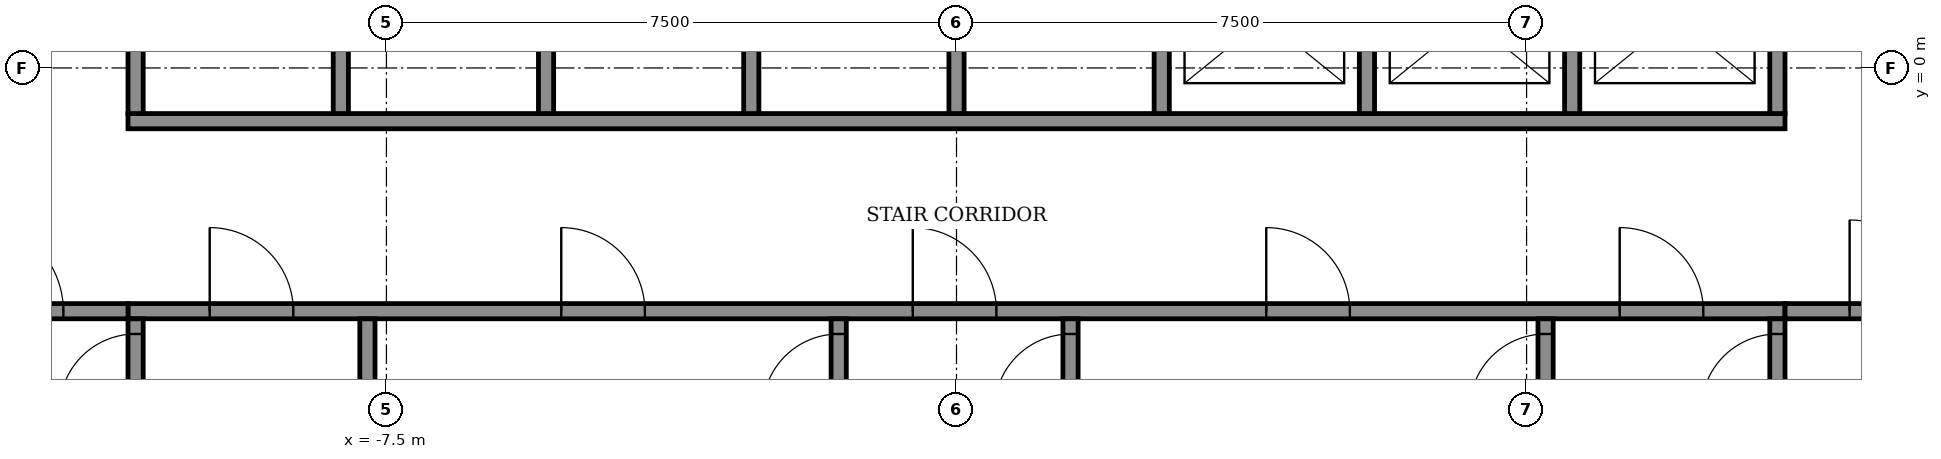
"""IFC4 building model, lengths in metres.
Left out: names, types, materials, properties, quantities, classifications, styles, units other than length and angle.
Written with IfcOpenShell. Run it as: python <this file> out.ifc"""

import sys

from ifc_helpers import new_model, si_unit, direction, frame, frame_2d, origin, place, context, subcontext, project, spatial, rectangle, extrude, element, fill, save


model = new_model("IFC4")
c1 = context("Model", 3, precision=1e-05, world=origin(), true_north=direction((0.0, 1.0)))
c2 = subcontext(c1, "Body", "Model", "MODEL_VIEW")
j1 = project(units=[si_unit("LENGTHUNIT", "METRE"), si_unit("PLANEANGLEUNIT", "RADIAN")], contexts=[c1])
p1 = place(None, origin())
s1 = spatial("IfcSite", under=j1, at=p1, CompositionType="ELEMENT")
p2 = place(p1, origin())
s2 = spatial("IfcBuilding", under=s1, at=p2, CompositionType="ELEMENT")
p3 = place(p2, frame((0.0, 0.0, 119.9)))
s3 = spatial("IfcBuildingStorey", under=s2, at=p3, CompositionType="ELEMENT", Elevation=119.9)
p4 = place(p3, frame((-10.9, -3.2, 0.0), z_axis=(0.0, 0.0, 1.0), x_axis=(1.0, 0.0, 0.0)))
e1 = element("IfcWall", 1, at=p4, inside=s3, PredefinedType="SHEAR", context=c2, shape_type="SweptSolid", body=[
    extrude(rectangle(XDim=21.8, YDim=0.2, at=frame_2d((10.9, 0.0))), origin(), (0.0, 0.0, 1.0), 5.05),
])
p5 = place(p4, frame((1.075, 0.0, 0.0)))
e2 = element("IfcOpeningElement", 2, at=p5, cuts=e1, PredefinedType="OPENING", context=c2, shape_type="SweptSolid", body=[
    extrude(rectangle(XDim=1.1, YDim=2.1, at=frame_2d((0.55, 1.05))), frame((0.0, 0.11, 0.0), z_axis=(0.0, -1.0, 0.0), x_axis=(1.0, 0.0, 0.0)), (0.0, 0.0, 1.0), 0.22),
])
p6 = place(p4, frame((10.325, 0.0, 0.0)))
e3 = element("IfcOpeningElement", 3, at=p6, cuts=e1, PredefinedType="OPENING", context=c2, shape_type="SweptSolid", body=[
    extrude(rectangle(XDim=1.1, YDim=2.1, at=frame_2d((0.55, 1.05))), frame((0.0, 0.11, 0.0), z_axis=(0.0, -1.0, 0.0), x_axis=(1.0, 0.0, 0.0)), (0.0, 0.0, 1.0), 0.22),
])
p7 = place(p4, frame((19.625, 0.0, 0.0)))
e4 = element("IfcOpeningElement", 4, at=p7, cuts=e1, PredefinedType="OPENING", context=c2, shape_type="SweptSolid", body=[
    extrude(rectangle(XDim=1.1, YDim=2.1, at=frame_2d((0.55, 1.05))), frame((0.0, 0.11, 0.0), z_axis=(0.0, -1.0, 0.0), x_axis=(1.0, 0.0, 0.0)), (0.0, 0.0, 1.0), 0.22),
])
p8 = place(p4, frame((5.7, 0.0, 0.0)))
e5 = element("IfcOpeningElement", 5, at=p8, cuts=e1, PredefinedType="OPENING", context=c2, shape_type="SweptSolid", body=[
    extrude(rectangle(XDim=1.1, YDim=2.1, at=frame_2d((0.55, 1.05))), frame((0.0, 0.11, 0.0), z_axis=(0.0, -1.0, 0.0), x_axis=(1.0, 0.0, 0.0)), (0.0, 0.0, 1.0), 0.22),
])
p9 = place(p4, frame((14.975, 0.0, 0.0)))
e6 = element("IfcOpeningElement", 6, at=p9, cuts=e1, PredefinedType="OPENING", context=c2, shape_type="SweptSolid", body=[
    extrude(rectangle(XDim=1.1, YDim=2.1, at=frame_2d((0.55, 1.05))), frame((0.0, 0.11, 0.0), z_axis=(0.0, -1.0, 0.0), x_axis=(1.0, 0.0, 0.0)), (0.0, 0.0, 1.0), 0.22),
])
p10 = place(p3, frame((-10.9, -0.7, 0.0), z_axis=(0.0, 0.0, 1.0), x_axis=(1.0, 0.0, 0.0)))
e7 = element("IfcWall", 7, at=p10, inside=s3, PredefinedType="SHEAR", context=c2, shape_type="SweptSolid", body=[
    extrude(rectangle(XDim=21.8, YDim=0.2, at=frame_2d((10.9, 0.0))), origin(), (0.0, 0.0, 1.0), 5.05),
])
p11 = place(p3, frame((-10.8, -10.8, 0.0), z_axis=(0.0, 0.0, 1.0), x_axis=(0.0, 1.0, 0.0)))
e8 = element("IfcWall", 8, at=p11, inside=s3, PredefinedType="SHEAR", context=c2, shape_type="SweptSolid", body=[
    extrude(rectangle(XDim=7.5, YDim=0.2, at=frame_2d((3.75, 0.0))), origin(), (0.0, 0.0, 1.0), 5.05),
])
p12 = place(p11, frame((6.3, 0.0, 0.0)))
e9 = element("IfcOpeningElement", 9, at=p12, cuts=e8, PredefinedType="OPENING", context=c2, shape_type="SweptSolid", body=[
    extrude(rectangle(XDim=1.0, YDim=2.1, at=frame_2d((0.5, 1.05))), frame((0.0, 0.11, 0.0), z_axis=(0.0, -1.0, 0.0), x_axis=(1.0, 0.0, 0.0)), (0.0, 0.0, 1.0), 0.22),
])
p13 = place(p3, frame((-7.75, -10.8, 0.0), z_axis=(0.0, 0.0, 1.0), x_axis=(0.0, 1.0, 0.0)))
e10 = element("IfcWall", 10, at=p13, inside=s3, PredefinedType="SHEAR", context=c2, shape_type="SweptSolid", body=[
    extrude(rectangle(XDim=7.5, YDim=0.2, at=frame_2d((3.75, 0.0))), origin(), (0.0, 0.0, 1.0), 5.05),
])
p14 = place(p3, frame((-1.55, -10.8, 0.0), z_axis=(0.0, 0.0, 1.0), x_axis=(0.0, 1.0, 0.0)))
e11 = element("IfcWall", 11, at=p14, inside=s3, PredefinedType="SHEAR", context=c2, shape_type="SweptSolid", body=[
    extrude(rectangle(XDim=7.5, YDim=0.2, at=frame_2d((3.75, 0.0))), origin(), (0.0, 0.0, 1.0), 5.05),
])
p15 = place(p14, frame((6.3, 0.0, 0.0)))
e12 = element("IfcOpeningElement", 12, at=p15, cuts=e11, PredefinedType="OPENING", context=c2, shape_type="SweptSolid", body=[
    extrude(rectangle(XDim=1.0, YDim=2.1, at=frame_2d((0.5, 1.05))), frame((0.0, 0.11, 0.0), z_axis=(0.0, -1.0, 0.0), x_axis=(1.0, 0.0, 0.0)), (0.0, 0.0, 1.0), 0.22),
])
p16 = place(p3, frame((1.5, -10.8, 0.0), z_axis=(0.0, 0.0, 1.0), x_axis=(0.0, 1.0, 0.0)))
e13 = element("IfcWall", 13, at=p16, inside=s3, PredefinedType="SHEAR", context=c2, shape_type="SweptSolid", body=[
    extrude(rectangle(XDim=7.5, YDim=0.2, at=frame_2d((3.75, 0.0))), origin(), (0.0, 0.0, 1.0), 5.05),
])
p17 = place(p16, frame((6.3, 0.0, 0.0)))
e14 = element("IfcOpeningElement", 14, at=p17, cuts=e13, PredefinedType="OPENING", context=c2, shape_type="SweptSolid", body=[
    extrude(rectangle(XDim=1.0, YDim=2.1, at=frame_2d((0.5, 1.05))), frame((0.0, 0.11, 0.0), z_axis=(0.0, -1.0, 0.0), x_axis=(1.0, 0.0, 0.0)), (0.0, 0.0, 1.0), 0.22),
])
p18 = place(p3, frame((7.75, -10.8, 0.0), z_axis=(0.0, 0.0, 1.0), x_axis=(0.0, 1.0, 0.0)))
e15 = element("IfcWall", 15, at=p18, inside=s3, PredefinedType="SHEAR", context=c2, shape_type="SweptSolid", body=[
    extrude(rectangle(XDim=7.5, YDim=0.2, at=frame_2d((3.75, 0.0))), origin(), (0.0, 0.0, 1.0), 5.05),
])
p19 = place(p18, frame((6.3, 0.0, 0.0)))
e16 = element("IfcOpeningElement", 16, at=p19, cuts=e15, PredefinedType="OPENING", context=c2, shape_type="SweptSolid", body=[
    extrude(rectangle(XDim=1.0, YDim=2.1, at=frame_2d((0.5, 1.05))), frame((0.0, 0.11, 0.0), z_axis=(0.0, -1.0, 0.0), x_axis=(1.0, 0.0, 0.0)), (0.0, 0.0, 1.0), 0.22),
])
p20 = place(p3, frame((10.8, -10.8, 0.0), z_axis=(0.0, 0.0, 1.0), x_axis=(0.0, 1.0, 0.0)))
e17 = element("IfcWall", 17, at=p20, inside=s3, PredefinedType="SHEAR", context=c2, shape_type="SweptSolid", body=[
    extrude(rectangle(XDim=7.5, YDim=0.2, at=frame_2d((3.75, 0.0))), origin(), (0.0, 0.0, 1.0), 5.05),
])
p21 = place(p20, frame((6.3, 0.0, 0.0)))
e18 = element("IfcOpeningElement", 18, at=p21, cuts=e17, PredefinedType="OPENING", context=c2, shape_type="SweptSolid", body=[
    extrude(rectangle(XDim=1.0, YDim=2.1, at=frame_2d((0.5, 1.05))), frame((0.0, 0.11, 0.0), z_axis=(0.0, -1.0, 0.0), x_axis=(1.0, 0.0, 0.0)), (0.0, 0.0, 1.0), 0.22),
])
for number, where, z_axis, x_axis in (
    (19, (-10.8, -0.6, 0.0), (0.0, 0.0, 1.0), (0.0, 1.0, 0.0)),
    (20, (-8.1, -0.6, 0.0), (0.0, 0.0, 1.0), (0.0, 1.0, 0.0)),
    (21, (-5.4, -0.6, 0.0), (0.0, 0.0, 1.0), (0.0, 1.0, 0.0)),
    (22, (-2.7, -0.6, 0.0), (0.0, 0.0, 1.0), (0.0, 1.0, 0.0)),
    (23, (0.0, -0.6, 0.0), (0.0, 0.0, 1.0), (0.0, 1.0, 0.0)),
    (24, (2.7, -0.6, 0.0), (0.0, 0.0, 1.0), (0.0, 1.0, 0.0)),
    (25, (5.4, -0.6, 0.0), (0.0, 0.0, 1.0), (0.0, 1.0, 0.0)),
    (26, (8.1, -0.6, 0.0), (0.0, 0.0, 1.0), (0.0, 1.0, 0.0)),
    (27, (10.8, -0.6, 0.0), (0.0, 0.0, 1.0), (0.0, 1.0, 0.0)),
):
    element("IfcWall", number, at=place(p3, frame(where, z_axis=z_axis, x_axis=x_axis)), inside=s3, PredefinedType="SHEAR", context=c2, shape_type="SweptSolid", body=[
        extrude(rectangle(XDim=2.5, YDim=0.2, at=frame_2d((1.25, 0.0))), origin(), (0.0, 0.0, 1.0), 5.05),
    ])
p22 = place(p3, frame((-13.8, -3.2, 0.0), z_axis=(0.0, 0.0, 1.0), x_axis=(1.0, 0.0, 0.0)))
e28 = element("IfcWall", 28, at=p22, inside=s3, PredefinedType="STANDARD", context=c2, shape_type="SweptSolid", body=[
    extrude(rectangle(XDim=2.9, YDim=0.2, at=frame_2d((1.45, 0.0))), origin(), (0.0, 0.0, 1.0), 5.05),
])
p23 = place(p22, frame((0.85, 0.0, 0.0)))
e29 = element("IfcOpeningElement", 29, at=p23, cuts=e28, PredefinedType="OPENING", context=c2, shape_type="SweptSolid", body=[
    extrude(rectangle(XDim=1.2, YDim=2.1, at=frame_2d((0.6, 1.05))), frame((0.0, 0.11, 0.0), z_axis=(0.0, -1.0, 0.0), x_axis=(1.0, 0.0, 0.0)), (0.0, 0.0, 1.0), 0.22),
])
p24 = place(p3, frame((10.9, -3.2, 0.0), z_axis=(0.0, 0.0, 1.0), x_axis=(1.0, 0.0, 0.0)))
e30 = element("IfcWall", 30, at=p24, inside=s3, PredefinedType="STANDARD", context=c2, shape_type="SweptSolid", body=[
    extrude(rectangle(XDim=2.9, YDim=0.2, at=frame_2d((1.45, 0.0))), origin(), (0.0, 0.0, 1.0), 5.05),
])
p25 = place(p24, frame((0.85, 0.0, 0.0)))
e31 = element("IfcOpeningElement", 31, at=p25, cuts=e30, PredefinedType="OPENING", context=c2, shape_type="SweptSolid", body=[
    extrude(rectangle(XDim=1.2, YDim=2.1, at=frame_2d((0.6, 1.05))), frame((0.0, 0.11, 0.0), z_axis=(0.0, -1.0, 0.0), x_axis=(1.0, 0.0, 0.0)), (0.0, 0.0, 1.0), 0.22),
])
p26 = place(p5, origin())
e32 = element("IfcDoor", 32, at=p26, inside=s3, OperationType="SINGLE_SWING_RIGHT", PredefinedType="DOOR", context=c2, shape_type="SweptSolid", body=[
    extrude(rectangle(XDim=1.1, YDim=2.1, at=frame_2d((0.55, 1.05))), frame((0.0, 0.025, 0.0), z_axis=(0.0, -1.0, 0.0), x_axis=(1.0, 0.0, 0.0)), (0.0, 0.0, 1.0), 0.05),
])
fill(e2, e32)
p27 = place(p6, origin())
e33 = element("IfcDoor", 33, at=p27, inside=s3, OperationType="SINGLE_SWING_RIGHT", PredefinedType="DOOR", context=c2, shape_type="SweptSolid", body=[
    extrude(rectangle(XDim=1.1, YDim=2.1, at=frame_2d((0.55, 1.05))), frame((0.0, 0.025, 0.0), z_axis=(0.0, -1.0, 0.0), x_axis=(1.0, 0.0, 0.0)), (0.0, 0.0, 1.0), 0.05),
])
fill(e3, e33)
p28 = place(p7, origin())
e34 = element("IfcDoor", 34, at=p28, inside=s3, OperationType="SINGLE_SWING_RIGHT", PredefinedType="DOOR", context=c2, shape_type="SweptSolid", body=[
    extrude(rectangle(XDim=1.1, YDim=2.1, at=frame_2d((0.55, 1.05))), frame((0.0, 0.025, 0.0), z_axis=(0.0, -1.0, 0.0), x_axis=(1.0, 0.0, 0.0)), (0.0, 0.0, 1.0), 0.05),
])
fill(e4, e34)
p29 = place(p8, origin())
e35 = element("IfcDoor", 35, at=p29, inside=s3, OperationType="SINGLE_SWING_LEFT", PredefinedType="DOOR", context=c2, shape_type="SweptSolid", body=[
    extrude(rectangle(XDim=1.1, YDim=2.1, at=frame_2d((0.55, 1.05))), frame((0.0, 0.025, 0.0), z_axis=(0.0, -1.0, 0.0), x_axis=(1.0, 0.0, 0.0)), (0.0, 0.0, 1.0), 0.05),
])
fill(e5, e35)
p30 = place(p9, origin())
e36 = element("IfcDoor", 36, at=p30, inside=s3, OperationType="SINGLE_SWING_LEFT", PredefinedType="DOOR", context=c2, shape_type="SweptSolid", body=[
    extrude(rectangle(XDim=1.1, YDim=2.1, at=frame_2d((0.55, 1.05))), frame((0.0, 0.025, 0.0), z_axis=(0.0, -1.0, 0.0), x_axis=(1.0, 0.0, 0.0)), (0.0, 0.0, 1.0), 0.05),
])
fill(e6, e36)
p31 = place(p15, origin())
e37 = element("IfcDoor", 37, at=p31, inside=s3, OperationType="SINGLE_SWING_RIGHT", PredefinedType="DOOR", context=c2, shape_type="SweptSolid", body=[
    extrude(rectangle(XDim=1.0, YDim=2.1, at=frame_2d((0.5, 1.05))), frame((0.0, 0.025, 0.0), z_axis=(0.0, -1.0, 0.0), x_axis=(1.0, 0.0, 0.0)), (0.0, 0.0, 1.0), 0.05),
])
fill(e12, e37)
p32 = place(p17, origin())
e38 = element("IfcDoor", 38, at=p32, inside=s3, OperationType="SINGLE_SWING_RIGHT", PredefinedType="DOOR", context=c2, shape_type="SweptSolid", body=[
    extrude(rectangle(XDim=1.0, YDim=2.1, at=frame_2d((0.5, 1.05))), frame((0.0, 0.025, 0.0), z_axis=(0.0, -1.0, 0.0), x_axis=(1.0, 0.0, 0.0)), (0.0, 0.0, 1.0), 0.05),
])
fill(e14, e38)
p33 = place(p19, origin())
e39 = element("IfcDoor", 39, at=p33, inside=s3, OperationType="SINGLE_SWING_RIGHT", PredefinedType="DOOR", context=c2, shape_type="SweptSolid", body=[
    extrude(rectangle(XDim=1.0, YDim=2.1, at=frame_2d((0.5, 1.05))), frame((0.0, 0.025, 0.0), z_axis=(0.0, -1.0, 0.0), x_axis=(1.0, 0.0, 0.0)), (0.0, 0.0, 1.0), 0.05),
])
fill(e16, e39)
p34 = place(p23, origin())
e40 = element("IfcDoor", 40, at=p34, inside=s3, OperationType="SINGLE_SWING_LEFT", PredefinedType="DOOR", context=c2, shape_type="SweptSolid", body=[
    extrude(rectangle(XDim=1.2, YDim=2.1, at=frame_2d((0.6, 1.05))), frame((0.0, 0.025, 0.0), z_axis=(0.0, -1.0, 0.0), x_axis=(1.0, 0.0, 0.0)), (0.0, 0.0, 1.0), 0.05),
])
fill(e29, e40)
p35 = place(p12, origin())
e41 = element("IfcDoor", 41, at=p35, inside=s3, OperationType="SINGLE_SWING_RIGHT", PredefinedType="DOOR", context=c2, shape_type="SweptSolid", body=[
    extrude(rectangle(XDim=1.0, YDim=2.1, at=frame_2d((0.5, 1.05))), frame((0.0, 0.025, 0.0), z_axis=(0.0, -1.0, 0.0), x_axis=(1.0, 0.0, 0.0)), (0.0, 0.0, 1.0), 0.05),
])
fill(e9, e41)
p36 = place(p25, origin())
e42 = element("IfcDoor", 42, at=p36, inside=s3, OperationType="SINGLE_SWING_LEFT", PredefinedType="DOOR", context=c2, shape_type="SweptSolid", body=[
    extrude(rectangle(XDim=1.2, YDim=2.1, at=frame_2d((0.6, 1.05))), frame((0.0, 0.025, 0.0), z_axis=(0.0, -1.0, 0.0), x_axis=(1.0, 0.0, 0.0)), (0.0, 0.0, 1.0), 0.05),
])
fill(e31, e42)
p37 = place(p21, origin())
e43 = element("IfcDoor", 43, at=p37, inside=s3, OperationType="SINGLE_SWING_RIGHT", PredefinedType="DOOR", context=c2, shape_type="SweptSolid", body=[
    extrude(rectangle(XDim=1.0, YDim=2.1, at=frame_2d((0.5, 1.05))), frame((0.0, 0.025, 0.0), z_axis=(0.0, -1.0, 0.0), x_axis=(1.0, 0.0, 0.0)), (0.0, 0.0, 1.0), 0.05),
])
fill(e18, e43)
save(model, sys.argv[1])
